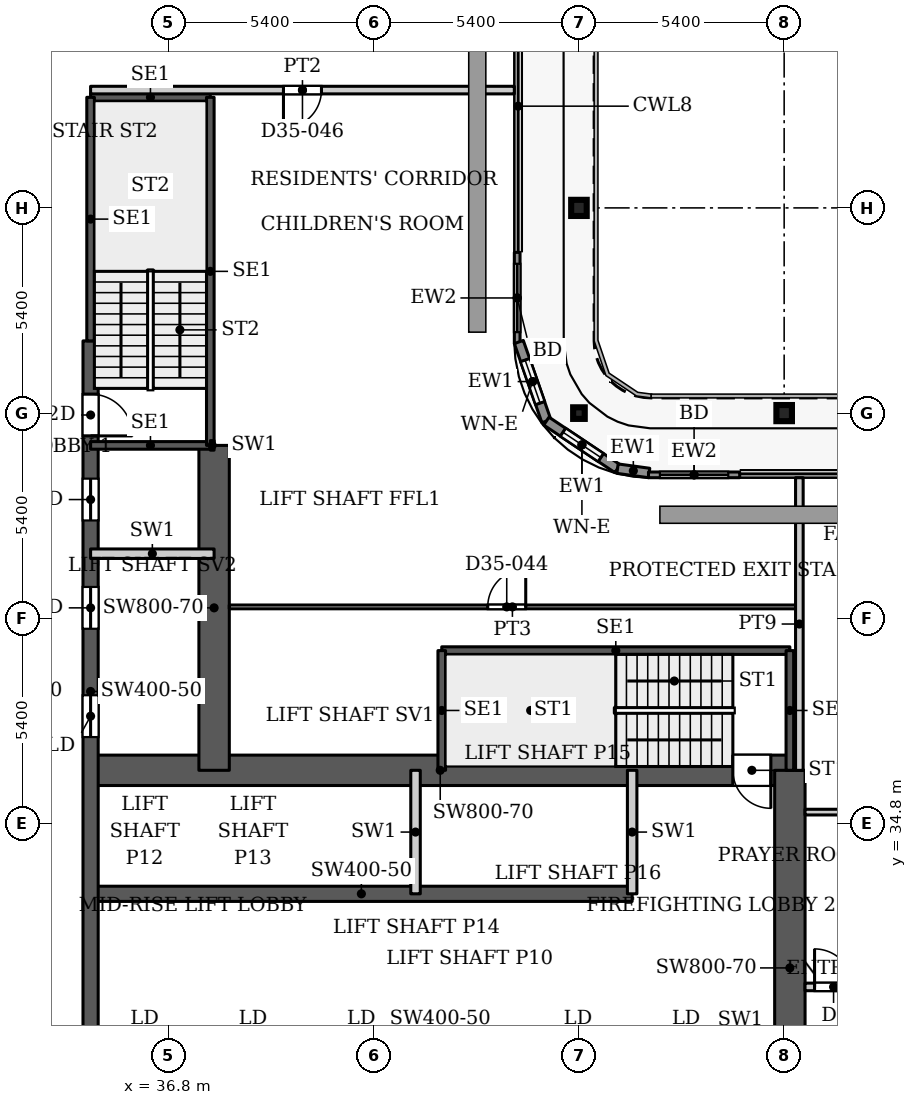
"""IFC4 building model, lengths in metres.
Left out: names, types, materials, properties, quantities, classifications, styles, units other than length and angle.
Written with IfcOpenShell. Run it as: python <this file> out.ifc"""

import sys

from ifc_helpers import new_model, si_unit, direction, frame, frame_2d, origin, origin_2d, place, context, subcontext, project, spatial, rectangle, hollow_rectangle, i_section, extrude, source, transform, mapped, element, fill, save


model = new_model("IFC4")
c1 = context("Model", 3, precision=1e-05, world=origin(), true_north=direction((0.0, 1.0)))
c2 = subcontext(c1, "Body", "Model", "MODEL_VIEW")
j1 = project(units=[si_unit("LENGTHUNIT", "METRE"), si_unit("PLANEANGLEUNIT", "RADIAN")], contexts=[c1])
p1 = place(None, origin())
s1 = spatial("IfcSite", under=j1, at=p1, CompositionType="ELEMENT")
p2 = place(p1, origin())
s2 = spatial("IfcBuilding", under=s1, at=p2, CompositionType="ELEMENT")
p3 = place(p2, frame((0.0, 0.0, 156.5)))
s3 = spatial("IfcBuildingStorey", under=s2, at=p3, CompositionType="ELEMENT", Elevation=156.5)
for number, where, z_axis, x_axis in (
    (1, (53.0, 45.6, 0.0), (0.0, 0.0, 1.0), (1.0, 0.0, 0.0)),
    (2, (47.6, 51.0, 0.0), (0.0, 0.0, 1.0), (1.0, 0.0, 0.0)),
):
    element("IfcColumn", number, at=place(p3, frame(where, z_axis=z_axis, x_axis=x_axis)), inside=s3, PredefinedType="COLUMN", context=c2, shape_type="SweptSolid", body=[
        extrude(i_section(OverallWidth=0.409, OverallDepth=0.425, WebThickness=0.033, FlangeThickness=0.052, FilletRadius=0.013, at=origin_2d()), origin(), (0.0, 0.0, 1.0), 3.9),
    ])
p4 = place(p3, frame((47.6, 45.6, 0.0), z_axis=(0.0, 0.0, 1.0), x_axis=(1.0, 0.0, 0.0)))
e3 = element("IfcColumn", 3, at=p4, inside=s3, PredefinedType="COLUMN", context=c2, shape_type="SweptSolid", body=[
    extrude(hollow_rectangle(XDim=0.305, YDim=0.305, WallThickness=0.016, InnerFilletRadius=0.016, OuterFilletRadius=0.032, at=origin_2d()), origin(), (0.0, 0.0, 1.0), 3.9),
])
p5 = place(p3, frame((34.75, 32.95, 0.0), z_axis=(0.0, 0.0, 1.0), x_axis=(1.0, 0.0, 0.0)))
e4 = element("IfcWall", 4, at=p5, inside=s3, PredefinedType="SHEAR", context=c2, shape_type="SweptSolid", body=[
    extrude(rectangle(XDim=14.25, YDim=0.4, at=frame_2d((7.125, 0.0))), origin(), (0.0, 0.0, 1.0), 3.9),
])
p6 = place(p3, frame((34.75, 36.2, 0.0), z_axis=(0.0, 0.0, 1.0), x_axis=(1.0, 0.0, 0.0)))
e5 = element("IfcWall", 5, at=p6, inside=s3, PredefinedType="SHEAR", context=c2, shape_type="SweptSolid", body=[
    extrude(rectangle(XDim=18.4, YDim=0.8, at=frame_2d((9.2, 0.0))), origin(), (0.0, 0.0, 1.0), 3.9),
])
p7 = place(p6, frame((16.9, 0.0, 0.0)))
e6 = element("IfcOpeningElement", 6, at=p7, cuts=e5, PredefinedType="OPENING", context=c2, shape_type="SweptSolid", body=[
    extrude(rectangle(XDim=1.0, YDim=2.2, at=frame_2d((0.5, 1.1))), frame((0.0, 0.41, 0.0), z_axis=(0.0, -1.0, 0.0), x_axis=(1.0, 0.0, 0.0)), (0.0, 0.0, 1.0), 0.82),
])
p8 = place(p3, frame((34.75, 29.05, 0.0), z_axis=(0.0, 0.0, 1.0), x_axis=(0.0, 1.0, 0.0)))
e7 = element("IfcWall", 7, at=p8, inside=s3, PredefinedType="SHEAR", context=c2, shape_type="SweptSolid", body=[
    extrude(rectangle(XDim=18.45, YDim=0.4, at=frame_2d((9.225, 0.0))), origin(), (0.0, 0.0, 1.0), 3.9),
])
p9 = place(p8, frame((8.025, 0.0, 0.0)))
e8 = element("IfcOpeningElement", 8, at=p9, cuts=e7, PredefinedType="OPENING", context=c2, shape_type="SweptSolid", body=[
    extrude(rectangle(XDim=1.1, YDim=2.2, at=frame_2d((0.55, 1.1))), frame((0.0, 0.21, 0.0), z_axis=(0.0, -1.0, 0.0), x_axis=(1.0, 0.0, 0.0)), (0.0, 0.0, 1.0), 0.42),
])
p10 = place(p8, frame((10.875, 0.0, 0.0)))
e9 = element("IfcOpeningElement", 9, at=p10, cuts=e7, PredefinedType="OPENING", context=c2, shape_type="SweptSolid", body=[
    extrude(rectangle(XDim=1.1, YDim=2.2, at=frame_2d((0.55, 1.1))), frame((0.0, 0.21, 0.0), z_axis=(0.0, -1.0, 0.0), x_axis=(1.0, 0.0, 0.0)), (0.0, 0.0, 1.0), 0.42),
])
p11 = place(p8, frame((13.725, 0.0, 0.0)))
e10 = element("IfcOpeningElement", 10, at=p11, cuts=e7, PredefinedType="OPENING", context=c2, shape_type="SweptSolid", body=[
    extrude(rectangle(XDim=1.1, YDim=2.2, at=frame_2d((0.55, 1.1))), frame((0.0, 0.21, 0.0), z_axis=(0.0, -1.0, 0.0), x_axis=(1.0, 0.0, 0.0)), (0.0, 0.0, 1.0), 0.42),
])
p12 = place(p8, frame((15.95, 0.0, 0.0)))
e11 = element("IfcOpeningElement", 11, at=p12, cuts=e7, PredefinedType="OPENING", context=c2, shape_type="SweptSolid", body=[
    extrude(rectangle(XDim=1.1, YDim=2.2, at=frame_2d((0.55, 1.1))), frame((0.0, 0.21, 0.0), z_axis=(0.0, -1.0, 0.0), x_axis=(1.0, 0.0, 0.0)), (0.0, 0.0, 1.0), 0.42),
])
p13 = place(p3, frame((38.0, 36.2, 0.0), z_axis=(0.0, 0.0, 1.0), x_axis=(0.0, 1.0, 0.0)))
e12 = element("IfcWall", 12, at=p13, inside=s3, PredefinedType="SHEAR", context=c2, shape_type="SweptSolid", body=[
    extrude(rectangle(XDim=8.55, YDim=0.8, at=frame_2d((4.275, 0.0))), origin(), (0.0, 0.0, 1.0), 3.9),
])
p14 = place(p3, frame((53.15, 25.8, 0.0), z_axis=(0.0, 0.0, 1.0), x_axis=(0.0, 1.0, 0.0)))
e13 = element("IfcWall", 13, at=p14, inside=s3, PredefinedType="SHEAR", context=c2, shape_type="SweptSolid", body=[
    extrude(rectangle(XDim=10.4, YDim=0.8, at=frame_2d((5.2, 0.0))), origin(), (0.0, 0.0, 1.0), 3.9),
])
p15 = place(p3, frame((45.975, 49.83, 0.0), z_axis=(0.0, 0.0, 1.0), x_axis=(0.0, -1.0, 0.0)))
e14 = element("IfcWall", 14, at=p15, inside=s3, PredefinedType="SOLIDWALL", context=c2, shape_type="SweptSolid", body=[
    extrude(rectangle(XDim=2.4, YDim=0.15, at=frame_2d((1.2, 0.0))), origin(), (0.0, 0.0, 1.0), 3.75),
])
p16 = place(p15, frame((0.3, 0.0, 0.0)))
e15 = element("IfcOpeningElement", 15, at=p16, cuts=e14, PredefinedType="OPENING", context=c2, shape_type="SweptSolid", body=[
    extrude(rectangle(XDim=1.8, YDim=2.4, at=frame_2d((0.9, 1.2))), frame((0.0, 0.085, 0.0), z_axis=(0.0, -1.0, 0.0), x_axis=(1.0, 0.0, 0.0)), (0.0, 0.0, 1.0), 0.17),
])
p17 = place(p3, frame((46.018, 47.471, 0.0), z_axis=(0.0, 0.0, 1.0), x_axis=(0.328791208903, -0.944402637093, 0.0)))
e16 = element("IfcWall", 16, at=p17, inside=s3, PredefinedType="SOLIDWALL", context=c2, shape_type="SweptSolid", body=[
    extrude(rectangle(XDim=2.205, YDim=0.25, at=frame_2d((1.102, 0.0))), origin(), (0.0, 0.0, 1.0), 3.75),
])
p18 = place(p17, frame((0.503, 0.0, 0.6)))
e17 = element("IfcOpeningElement", 17, at=p18, cuts=e16, PredefinedType="OPENING", context=c2, shape_type="SweptSolid", body=[
    extrude(rectangle(XDim=1.2, YDim=2.1, at=frame_2d((0.6, 1.05))), frame((0.0, 0.135, 0.0), z_axis=(0.0, -1.0, 0.0), x_axis=(1.0, 0.0, 0.0)), (0.0, 0.0, 1.0), 0.27),
])
p19 = place(p3, frame((46.743, 45.389, 0.0), z_axis=(0.0, 0.0, 1.0), x_axis=(0.831449265529, -0.555600682912, 0.0)))
e18 = element("IfcWall", 18, at=p19, inside=s3, PredefinedType="SOLIDWALL", context=c2, shape_type="SweptSolid", body=[
    extrude(rectangle(XDim=2.251, YDim=0.25, at=frame_2d((1.126, 0.0))), origin(), (0.0, 0.0, 1.0), 3.75),
])
p20 = place(p19, frame((0.525, 0.0, 0.6)))
e19 = element("IfcOpeningElement", 19, at=p20, cuts=e18, PredefinedType="OPENING", context=c2, shape_type="SweptSolid", body=[
    extrude(rectangle(XDim=1.2, YDim=2.1, at=frame_2d((0.6, 1.05))), frame((0.0, 0.135, 0.0), z_axis=(0.0, -1.0, 0.0), x_axis=(1.0, 0.0, 0.0)), (0.0, 0.0, 1.0), 0.27),
])
p21 = place(p3, frame((48.615, 44.138, 0.0), z_axis=(0.0, 0.0, 1.0), x_axis=(0.990741504246, -0.135761819977, 0.0)))
e20 = element("IfcWall", 20, at=p21, inside=s3, PredefinedType="SOLIDWALL", context=c2, shape_type="SweptSolid", body=[
    extrude(rectangle(XDim=0.84, YDim=0.25, at=frame_2d((0.42, 0.0))), origin(), (0.0, 0.0, 1.0), 3.75),
])
p22 = place(p3, frame((49.43, 43.975, 0.0), z_axis=(0.0, 0.0, 1.0), x_axis=(1.0, 0.0, 0.0)))
e21 = element("IfcWall", 21, at=p22, inside=s3, PredefinedType="SOLIDWALL", context=c2, shape_type="SweptSolid", body=[
    extrude(rectangle(XDim=2.4, YDim=0.15, at=frame_2d((1.2, 0.0))), origin(), (0.0, 0.0, 1.0), 3.75),
])
p23 = place(p22, frame((0.3, 0.0, 0.0)))
e22 = element("IfcOpeningElement", 22, at=p23, cuts=e21, PredefinedType="OPENING", context=c2, shape_type="SweptSolid", body=[
    extrude(rectangle(XDim=1.8, YDim=2.4, at=frame_2d((0.9, 1.2))), frame((0.0, 0.085, 0.0), z_axis=(0.0, -1.0, 0.0), x_axis=(1.0, 0.0, 0.0)), (0.0, 0.0, 1.0), 0.17),
])
p24 = place(p3, frame((43.99, 39.35, 0.0), z_axis=(0.0, 0.0, 1.0), x_axis=(1.0, 0.0, 0.0)))
e23 = element("IfcWall", 23, at=p24, inside=s3, PredefinedType="SHEAR", context=c2, shape_type="SweptSolid", body=[
    extrude(rectangle(XDim=9.16, YDim=0.2, at=frame_2d((4.58, 0.0))), origin(), (0.0, 0.0, 1.0), 3.9),
])
for number, where, z_axis, x_axis in (
    (24, (43.99, 36.2, 0.0), (0.0, 0.0, 1.0), (0.0, 1.0, 0.0)),
    (25, (53.15, 36.2, 0.0), (0.0, 0.0, 1.0), (0.0, 1.0, 0.0)),
):
    element("IfcWall", number, at=place(p3, frame(where, z_axis=z_axis, x_axis=x_axis)), inside=s3, PredefinedType="SHEAR", context=c2, shape_type="SweptSolid", body=[
        extrude(rectangle(XDim=3.15, YDim=0.2, at=frame_2d((1.575, 0.0))), origin(), (0.0, 0.0, 1.0), 3.9),
    ])
for number, where, z_axis, x_axis in (
    (26, (34.75, 44.75, 0.0), (0.0, 0.0, 1.0), (1.0, 0.0, 0.0)),
    (27, (34.75, 53.91, 0.0), (0.0, 0.0, 1.0), (1.0, 0.0, 0.0)),
):
    element("IfcWall", number, at=place(p3, frame(where, z_axis=z_axis, x_axis=x_axis)), inside=s3, PredefinedType="SHEAR", context=c2, shape_type="SweptSolid", body=[
        extrude(rectangle(XDim=3.15, YDim=0.2, at=frame_2d((1.575, 0.0))), origin(), (0.0, 0.0, 1.0), 3.9),
    ])
p25 = place(p3, frame((34.75, 47.5, 0.0), z_axis=(0.0, 0.0, 1.0), x_axis=(0.0, 1.0, 0.0)))
e28 = element("IfcWall", 28, at=p25, inside=s3, PredefinedType="SHEAR", context=c2, shape_type="SweptSolid", body=[
    extrude(rectangle(XDim=6.41, YDim=0.2, at=frame_2d((3.205, 0.0))), origin(), (0.0, 0.0, 1.0), 3.9),
])
p26 = place(p3, frame((37.9, 44.75, 0.0), z_axis=(0.0, 0.0, 1.0), x_axis=(0.0, 1.0, 0.0)))
e29 = element("IfcWall", 29, at=p26, inside=s3, PredefinedType="SHEAR", context=c2, shape_type="SweptSolid", body=[
    extrude(rectangle(XDim=9.16, YDim=0.2, at=frame_2d((4.58, 0.0))), origin(), (0.0, 0.0, 1.0), 3.9),
])
for number, where, z_axis, x_axis in (
    (30, (43.3, 32.95, 0.0), (0.0, 0.0, 1.0), (0.0, 1.0, 0.0)),
    (31, (49.0, 32.95, 0.0), (0.0, 0.0, 1.0), (0.0, 1.0, 0.0)),
    (32, (34.75, 41.9, 0.0), (0.0, 0.0, 1.0), (1.0, 0.0, 0.0)),
):
    element("IfcWall", number, at=place(p3, frame(where, z_axis=z_axis, x_axis=x_axis)), inside=s3, PredefinedType="PARTITIONING", context=c2, shape_type="SweptSolid", body=[
        extrude(rectangle(XDim=3.25, YDim=0.25, at=frame_2d((1.625, 0.0))), origin(), (0.0, 0.0, 1.0), 3.9),
    ])
p27 = place(p3, frame((37.9, 44.75, 0.0), z_axis=(0.0, 0.0, 1.0), x_axis=(1.0, 0.0, 0.0)))
e33 = element("IfcWall", 33, at=p27, inside=s3, PredefinedType="PARTITIONING", context=c2, shape_type="SweptSolid", body=[
    extrude(rectangle(XDim=0.1, YDim=0.25, at=frame_2d((0.05, 0.0))), origin(), (0.0, 0.0, 1.0), 3.9),
])
p28 = place(p3, frame((34.75, 54.1, 0.0), z_axis=(0.0, 0.0, 1.0), x_axis=(1.0, 0.0, 0.0)))
e34 = element("IfcWall", 34, at=p28, inside=s3, PredefinedType="PARTITIONING", context=c2, shape_type="SweptSolid", body=[
    extrude(rectangle(XDim=11.15, YDim=0.2, at=frame_2d((5.575, 0.0))), origin(), (0.0, 0.0, 1.0), 3.6),
])
p29 = place(p28, frame((5.075, 0.0, 0.0)))
e35 = element("IfcOpeningElement", 35, at=p29, cuts=e34, PredefinedType="OPENING", context=c2, shape_type="SweptSolid", body=[
    extrude(rectangle(XDim=1.0, YDim=2.1, at=frame_2d((0.5, 1.05))), frame((0.0, 0.11, 0.0), z_axis=(0.0, -1.0, 0.0), x_axis=(1.0, 0.0, 0.0)), (0.0, 0.0, 1.0), 0.22),
])
p30 = place(p3, frame((38.399, 40.5, 0.0), z_axis=(0.0, 0.0, 1.0), x_axis=(1.0, 0.0, 0.0)))
e36 = element("IfcWall", 36, at=p30, inside=s3, PredefinedType="PARTITIONING", context=c2, shape_type="SweptSolid", body=[
    extrude(rectangle(XDim=14.901, YDim=0.1, at=frame_2d((7.451, 0.0))), origin(), (0.0, 0.0, 1.0), 3.6),
])
p31 = place(p30, frame((6.801, 0.0, 0.0)))
e37 = element("IfcOpeningElement", 37, at=p31, cuts=e36, PredefinedType="OPENING", context=c2, shape_type="SweptSolid", body=[
    extrude(rectangle(XDim=1.0, YDim=2.1, at=frame_2d((0.5, 1.05))), frame((0.0, 0.06, 0.0), z_axis=(0.0, -1.0, 0.0), x_axis=(1.0, 0.0, 0.0)), (0.0, 0.0, 1.0), 0.12),
])
p32 = place(p3, frame((53.4, 36.199, 0.0), z_axis=(0.0, 0.0, 1.0), x_axis=(0.0, 1.0, 0.0)))
e38 = element("IfcWall", 38, at=p32, inside=s3, PredefinedType="PARTITIONING", context=c2, shape_type="SweptSolid", body=[
    extrude(rectangle(XDim=7.701, YDim=0.2, at=frame_2d((3.851, 0.0))), origin(), (0.0, 0.0, 1.0), 3.6),
])
p33 = place(p3, frame((53.549, 30.5, 0.0), z_axis=(0.0, 0.0, 1.0), x_axis=(1.0, 0.0, 0.0)))
e39 = element("IfcWall", 39, at=p33, inside=s3, PredefinedType="PARTITIONING", context=c2, shape_type="SweptSolid", body=[
    extrude(rectangle(XDim=35.551, YDim=0.2, at=frame_2d((17.775, 0.0))), origin(), (0.0, 0.0, 1.0), 3.6),
])
p34 = place(p33, frame((0.251, 0.0, 0.0)))
e40 = element("IfcOpeningElement", 40, at=p34, cuts=e39, PredefinedType="OPENING", context=c2, shape_type="SweptSolid", body=[
    extrude(rectangle(XDim=1.0, YDim=2.1, at=frame_2d((0.5, 1.05))), frame((0.0, 0.11, 0.0), z_axis=(0.0, -1.0, 0.0), x_axis=(1.0, 0.0, 0.0)), (0.0, 0.0, 1.0), 0.22),
])
p35 = place(p33, frame((21.701, 0.0, 0.0)))
e41 = element("IfcOpeningElement", 41, at=p35, cuts=e39, PredefinedType="OPENING", context=c2, shape_type="SweptSolid", body=[
    extrude(rectangle(XDim=1.0, YDim=2.1, at=frame_2d((0.5, 1.05))), frame((0.0, 0.11, 0.0), z_axis=(0.0, -1.0, 0.0), x_axis=(1.0, 0.0, 0.0)), (0.0, 0.0, 1.0), 0.22),
])
p36 = place(p33, frame((32.201, 0.0, 0.0)))
e42 = element("IfcOpeningElement", 42, at=p36, cuts=e39, PredefinedType="OPENING", context=c2, shape_type="SweptSolid", body=[
    extrude(rectangle(XDim=1.0, YDim=2.1, at=frame_2d((0.5, 1.05))), frame((0.0, 0.11, 0.0), z_axis=(0.0, -1.0, 0.0), x_axis=(1.0, 0.0, 0.0)), (0.0, 0.0, 1.0), 0.22),
])
p37 = place(p3, frame((53.549, 35.1, 0.0), z_axis=(0.0, 0.0, 1.0), x_axis=(1.0, 0.0, 0.0)))
e43 = element("IfcWall", 43, at=p37, inside=s3, PredefinedType="PARTITIONING", context=c2, shape_type="SweptSolid", body=[
    extrude(rectangle(XDim=9.051, YDim=0.15, at=frame_2d((4.525, 0.0))), origin(), (0.0, 0.0, 1.0), 3.6),
])
p38 = place(p37, frame((6.751, 0.0, 0.0)))
e44 = element("IfcOpeningElement", 44, at=p38, cuts=e43, PredefinedType="OPENING", context=c2, shape_type="SweptSolid", body=[
    extrude(rectangle(XDim=0.9, YDim=2.1, at=frame_2d((0.45, 1.05))), frame((0.0, 0.085, 0.0), z_axis=(0.0, -1.0, 0.0), x_axis=(1.0, 0.0, 0.0)), (0.0, 0.0, 1.0), 0.17),
])
p39 = place(p37, frame((2.051, 0.0, 0.0)))
e45 = element("IfcOpeningElement", 45, at=p39, cuts=e43, PredefinedType="OPENING", context=c2, shape_type="SweptSolid", body=[
    extrude(rectangle(XDim=1.0, YDim=2.1, at=frame_2d((0.5, 1.05))), frame((0.0, 0.085, 0.0), z_axis=(0.0, -1.0, 0.0), x_axis=(1.0, 0.0, 0.0)), (0.0, 0.0, 1.0), 0.17),
])
m1 = source(origin(), c2, "Body", "SweptSolid", [
    extrude(rectangle(XDim=1.8, YDim=2.4, at=frame_2d((0.9, 1.2))), frame((0.0, 0.025, 0.0), z_axis=(0.0, -1.0, 0.0), x_axis=(1.0, 0.0, 0.0)), (0.0, 0.0, 1.0), 0.05),
])
p40 = place(p16, origin())
e46 = element("IfcDoor", 46, at=p40, inside=s3, OperationType="SLIDING_TO_LEFT", PredefinedType="DOOR", context=c2, shape_type="MappedRepresentation", body=[
    mapped(m1, transform((0.0, 0.0, 0.0), x_axis=(1.0, 0.0, 0.0), y_axis=(0.0, 1.0, 0.0), z_axis=(0.0, 0.0, 1.0), scale=1.0)),
])
fill(e15, e46)
m2 = source(origin(), c2, "Body", "SweptSolid", [
    extrude(rectangle(XDim=1.2, YDim=2.1, at=frame_2d((0.6, 1.05))), frame((0.0, 0.03, 0.0), z_axis=(0.0, -1.0, 0.0), x_axis=(1.0, 0.0, 0.0)), (0.0, 0.0, 1.0), 0.06),
])
p41 = place(p18, origin())
e47 = element("IfcWindow", 47, at=p41, inside=s3, PartitioningType="SINGLE_PANEL", PredefinedType="WINDOW", context=c2, shape_type="MappedRepresentation", body=[
    mapped(m2, transform((0.0, 0.0, 0.0), x_axis=(1.0, 0.0, 0.0), y_axis=(0.0, 1.0, 0.0), z_axis=(0.0, 0.0, 1.0), scale=1.0)),
])
fill(e17, e47)
p42 = place(p20, origin())
e48 = element("IfcWindow", 48, at=p42, inside=s3, PartitioningType="SINGLE_PANEL", PredefinedType="WINDOW", context=c2, shape_type="MappedRepresentation", body=[
    mapped(m2, transform((0.0, 0.0, 0.0), x_axis=(1.0, 0.0, 0.0), y_axis=(0.0, 1.0, 0.0), z_axis=(0.0, 0.0, 1.0), scale=1.0)),
])
fill(e19, e48)
p43 = place(p23, origin())
e49 = element("IfcDoor", 49, at=p43, inside=s3, OperationType="SLIDING_TO_LEFT", PredefinedType="DOOR", context=c2, shape_type="MappedRepresentation", body=[
    mapped(m1, transform((0.0, 0.0, 0.0), x_axis=(1.0, 0.0, 0.0), y_axis=(0.0, 1.0, 0.0), z_axis=(0.0, 0.0, 1.0), scale=1.0)),
])
fill(e22, e49)
m3 = source(origin(), c2, "Body", "SweptSolid", [
    extrude(rectangle(XDim=1.1, YDim=2.2, at=frame_2d((0.55, 1.1))), frame((0.0, 0.025, 0.0), z_axis=(0.0, -1.0, 0.0), x_axis=(1.0, 0.0, 0.0)), (0.0, 0.0, 1.0), 0.05),
])
p44 = place(p9, origin())
e50 = element("IfcDoor", 50, at=p44, inside=s3, OperationType="SLIDING_TO_LEFT", PredefinedType="DOOR", context=c2, shape_type="MappedRepresentation", body=[
    mapped(m3, transform((0.0, 0.0, 0.0), x_axis=(1.0, 0.0, 0.0), y_axis=(0.0, 1.0, 0.0), z_axis=(0.0, 0.0, 1.0), scale=1.0)),
])
fill(e8, e50)
p45 = place(p10, origin())
e51 = element("IfcDoor", 51, at=p45, inside=s3, OperationType="SLIDING_TO_LEFT", PredefinedType="DOOR", context=c2, shape_type="MappedRepresentation", body=[
    mapped(m3, transform((0.0, 0.0, 0.0), x_axis=(1.0, 0.0, 0.0), y_axis=(0.0, 1.0, 0.0), z_axis=(0.0, 0.0, 1.0), scale=1.0)),
])
fill(e9, e51)
p46 = place(p11, origin())
e52 = element("IfcDoor", 52, at=p46, inside=s3, OperationType="SLIDING_TO_LEFT", PredefinedType="DOOR", context=c2, shape_type="MappedRepresentation", body=[
    mapped(m3, transform((0.0, 0.0, 0.0), x_axis=(1.0, 0.0, 0.0), y_axis=(0.0, 1.0, 0.0), z_axis=(0.0, 0.0, 1.0), scale=1.0)),
])
fill(e10, e52)
m4 = source(origin(), c2, "Body", "SweptSolid", [
    extrude(rectangle(XDim=1.0, YDim=2.2, at=frame_2d((0.5, 1.1))), frame((0.0, 0.025, 0.0), z_axis=(0.0, -1.0, 0.0), x_axis=(1.0, 0.0, 0.0)), (0.0, 0.0, 1.0), 0.05),
])
p47 = place(p7, origin())
e53 = element("IfcDoor", 53, at=p47, inside=s3, OperationType="SINGLE_SWING_RIGHT", PredefinedType="DOOR", context=c2, shape_type="MappedRepresentation", body=[
    mapped(m4, transform((0.0, 0.0, 0.0), x_axis=(1.0, 0.0, 0.0), y_axis=(0.0, 1.0, 0.0), z_axis=(0.0, 0.0, 1.0), scale=1.0)),
])
fill(e6, e53)
m5 = source(origin(), c2, "Body", "SweptSolid", [
    extrude(rectangle(XDim=1.1, YDim=2.2, at=frame_2d((0.55, 1.1))), frame((0.0, 0.025, 0.0), z_axis=(0.0, -1.0, 0.0), x_axis=(1.0, 0.0, 0.0)), (0.0, 0.0, 1.0), 0.05),
])
p48 = place(p12, origin())
e54 = element("IfcDoor", 54, at=p48, inside=s3, OperationType="SINGLE_SWING_RIGHT", PredefinedType="DOOR", context=c2, shape_type="MappedRepresentation", body=[
    mapped(m5, transform((0.0, 0.0, 0.0), x_axis=(1.0, 0.0, 0.0), y_axis=(0.0, 1.0, 0.0), z_axis=(0.0, 0.0, 1.0), scale=1.0)),
])
fill(e11, e54)
m6 = source(origin(), c2, "Body", "SweptSolid", [
    extrude(rectangle(XDim=1.0, YDim=2.1, at=frame_2d((0.5, 1.05))), frame((0.0, 0.025, 0.0), z_axis=(0.0, -1.0, 0.0), x_axis=(1.0, 0.0, 0.0)), (0.0, 0.0, 1.0), 0.05),
])
p49 = place(p34, origin())
e55 = element("IfcDoor", 55, at=p49, inside=s3, OperationType="SINGLE_SWING_LEFT", PredefinedType="DOOR", context=c2, shape_type="MappedRepresentation", body=[
    mapped(m6, transform((0.0, 0.0, 0.0), x_axis=(1.0, 0.0, 0.0), y_axis=(0.0, 1.0, 0.0), z_axis=(0.0, 0.0, 1.0), scale=1.0)),
])
fill(e40, e55)
m7 = source(origin(), c2, "Body", "SweptSolid", [
    extrude(rectangle(XDim=1.0, YDim=2.1, at=frame_2d((0.5, 1.05))), frame((0.0, 0.025, 0.0), z_axis=(0.0, -1.0, 0.0), x_axis=(1.0, 0.0, 0.0)), (0.0, 0.0, 1.0), 0.05),
])
p50 = place(p31, origin())
e56 = element("IfcDoor", 56, at=p50, inside=s3, OperationType="SINGLE_SWING_LEFT", PredefinedType="DOOR", context=c2, shape_type="MappedRepresentation", body=[
    mapped(m7, transform((0.0, 0.0, 0.0), x_axis=(1.0, 0.0, 0.0), y_axis=(0.0, 1.0, 0.0), z_axis=(0.0, 0.0, 1.0), scale=1.0)),
])
fill(e37, e56)
m8 = source(origin(), c2, "Body", "SweptSolid", [
    extrude(rectangle(XDim=1.0, YDim=2.1, at=frame_2d((0.5, 1.05))), frame((0.0, 0.025, 0.0), z_axis=(0.0, -1.0, 0.0), x_axis=(1.0, 0.0, 0.0)), (0.0, 0.0, 1.0), 0.05),
])
p51 = place(p29, origin())
e57 = element("IfcDoor", 57, at=p51, inside=s3, OperationType="SINGLE_SWING_RIGHT", PredefinedType="DOOR", context=c2, shape_type="MappedRepresentation", body=[
    mapped(m8, transform((0.0, 0.0, 0.0), x_axis=(1.0, 0.0, 0.0), y_axis=(0.0, 1.0, 0.0), z_axis=(0.0, 0.0, 1.0), scale=1.0)),
])
fill(e35, e57)
save(model, sys.argv[1])
